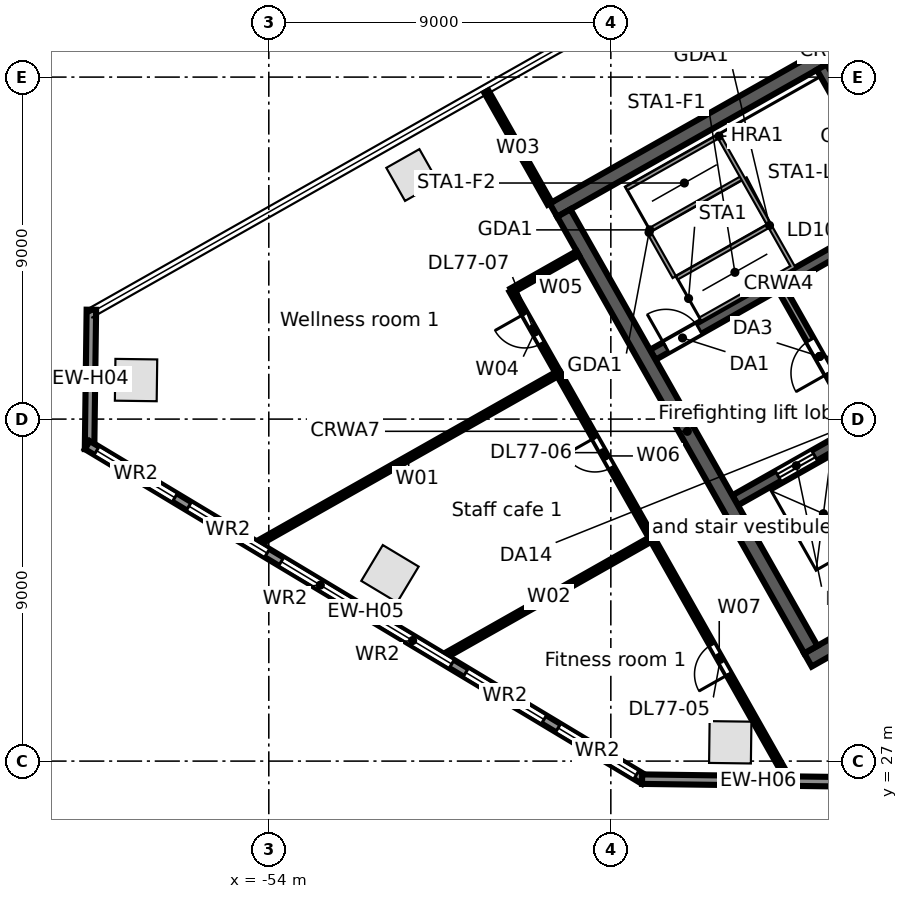
"""IFC4 building model, lengths in metres.
Left out: names, types, materials, properties, quantities, classifications, styles, units other than length and angle.
Written with IfcOpenShell. Run it as: python <this file> out.ifc"""

import sys

from ifc_helpers import new_model, si_unit, direction, frame, frame_2d, origin, origin_2d, place, context, subcontext, project, spatial, rectangle, extrude, element, fill, save


model = new_model("IFC4")
c1 = context("Model", 3, precision=1e-05, world=origin(), true_north=direction((0.0, 1.0)))
c2 = subcontext(c1, "Body", "Model", "MODEL_VIEW")
j1 = project(units=[si_unit("LENGTHUNIT", "METRE"), si_unit("PLANEANGLEUNIT", "RADIAN")], contexts=[c1])
p1 = place(None, origin())
s1 = spatial("IfcSite", under=j1, at=p1, CompositionType="ELEMENT")
p2 = place(p1, origin())
s2 = spatial("IfcBuilding", under=s1, at=p2, CompositionType="ELEMENT")
p3 = place(p2, frame((0.0, 0.0, 343.1)))
s3 = spatial("IfcBuildingStorey", under=s2, at=p3, CompositionType="ELEMENT", Elevation=343.1)
p4 = place(p3, frame((-50.226, 42.423, 0.0), z_axis=(0.0, 0.0, 1.0), x_axis=(-0.87035569594, -0.492423560103, 0.0)))
e1 = element("IfcColumn", 1, at=p4, inside=s3, PredefinedType="COLUMN", context=c2, shape_type="SweptSolid", body=[
    extrude(rectangle(XDim=1.0, YDim=1.0, at=origin_2d()), origin(), (0.0, 0.0, 1.0), 3.8),
])
for number, where, z_axis, x_axis in (
    (2, (-57.493, 37.027, 0.0), (0.0, 0.0, 1.0), (-0.013, -1.0, 0.0)),
    (3, (-50.812, 31.931, 0.0), (0.0, 0.0, 1.0), (0.857, -0.515, 0.0)),
    (4, (-41.858, 27.495, 0.0), (0.0, 0.0, 1.0), (1.0, -0.013, 0.0)),
):
    element("IfcColumn", number, at=place(p3, frame(where, z_axis=z_axis, x_axis=x_axis)), inside=s3, PredefinedType="COLUMN", context=c2, shape_type="SweptSolid", body=[
        extrude(rectangle(XDim=1.1, YDim=1.1, at=origin_2d()), origin(), (0.0, 0.0, 1.0), 3.8),
    ])
p5 = place(p3, frame((-58.717, 35.208, 0.0), z_axis=(0.0, 0.0, 1.0), x_axis=(0.01310512158, 0.999914124207, 0.0)))
e5 = element("IfcWall", 5, at=p5, inside=s3, PredefinedType="STANDARD", context=c2, shape_type="SweptSolid", body=[
    extrude(rectangle(XDim=3.67, YDim=0.25, at=frame_2d((1.835, 0.0))), origin(), (0.0, 0.0, 1.0), 3.5),
])
p6 = place(p3, frame((-44.115, 26.507, 0.0), z_axis=(0.0, 0.0, 1.0), x_axis=(-0.857166583633, 0.515039268311, 0.0)))
e6 = element("IfcWall", 6, at=p6, inside=s3, PredefinedType="STANDARD", context=c2, shape_type="SweptSolid", body=[
    extrude(rectangle(XDim=17.106, YDim=0.25, at=frame_2d((8.553, 0.0))), origin(), (0.0, 0.0, 1.0), 3.5),
])
p7 = place(p6, frame((14.417, 0.0, 0.8)))
e7 = element("IfcOpeningElement", 7, at=p7, cuts=e6, PredefinedType="OPENING", context=c2, shape_type="SweptSolid", body=[
    extrude(rectangle(XDim=2.4, YDim=2.2, at=frame_2d((1.2, 1.1))), frame((0.0, 0.135, 0.0), z_axis=(0.0, -1.0, 0.0), x_axis=(1.0, 0.0, 0.0)), (0.0, 0.0, 1.0), 0.27),
])
p8 = place(p6, frame((11.584, 0.0, 0.8)))
e8 = element("IfcOpeningElement", 8, at=p8, cuts=e6, PredefinedType="OPENING", context=c2, shape_type="SweptSolid", body=[
    extrude(rectangle(XDim=2.4, YDim=2.2, at=frame_2d((1.2, 1.1))), frame((0.0, 0.135, 0.0), z_axis=(0.0, -1.0, 0.0), x_axis=(1.0, 0.0, 0.0)), (0.0, 0.0, 1.0), 0.27),
])
p9 = place(p6, frame((8.75, 0.0, 0.8)))
e9 = element("IfcOpeningElement", 9, at=p9, cuts=e6, PredefinedType="OPENING", context=c2, shape_type="SweptSolid", body=[
    extrude(rectangle(XDim=2.4, YDim=2.2, at=frame_2d((1.2, 1.1))), frame((0.0, 0.135, 0.0), z_axis=(0.0, -1.0, 0.0), x_axis=(1.0, 0.0, 0.0)), (0.0, 0.0, 1.0), 0.27),
])
p10 = place(p6, frame((5.917, 0.0, 0.8)))
e10 = element("IfcOpeningElement", 10, at=p10, cuts=e6, PredefinedType="OPENING", context=c2, shape_type="SweptSolid", body=[
    extrude(rectangle(XDim=2.4, YDim=2.2, at=frame_2d((1.2, 1.1))), frame((0.0, 0.135, 0.0), z_axis=(0.0, -1.0, 0.0), x_axis=(1.0, 0.0, 0.0)), (0.0, 0.0, 1.0), 0.27),
])
p11 = place(p6, frame((3.084, 0.0, 0.8)))
e11 = element("IfcOpeningElement", 11, at=p11, cuts=e6, PredefinedType="OPENING", context=c2, shape_type="SweptSolid", body=[
    extrude(rectangle(XDim=2.4, YDim=2.2, at=frame_2d((1.2, 1.1))), frame((0.0, 0.135, 0.0), z_axis=(0.0, -1.0, 0.0), x_axis=(1.0, 0.0, 0.0)), (0.0, 0.0, 1.0), 0.27),
])
p12 = place(p6, frame((0.25, 0.0, 0.8)))
e12 = element("IfcOpeningElement", 12, at=p12, cuts=e6, PredefinedType="OPENING", context=c2, shape_type="SweptSolid", body=[
    extrude(rectangle(XDim=2.4, YDim=2.2, at=frame_2d((1.2, 1.1))), frame((0.0, 0.135, 0.0), z_axis=(0.0, -1.0, 0.0), x_axis=(1.0, 0.0, 0.0)), (0.0, 0.0, 1.0), 0.27),
])
p13 = place(p3, frame((-38.064, 26.445, 0.0), z_axis=(0.0, 0.0, 1.0), x_axis=(-0.999914239143, 0.013096349097, 0.0)))
e13 = element("IfcWall", 13, at=p13, inside=s3, PredefinedType="STANDARD", context=c2, shape_type="SweptSolid", body=[
    extrude(rectangle(XDim=6.115, YDim=0.25, at=frame_2d((3.057, 0.0))), origin(), (0.0, 0.0, 1.0), 3.5),
])
p14 = place(p3, frame((-39.813, 29.662, 0.0), z_axis=(0.0, 0.0, 1.0), x_axis=(0.870350116061, 0.492433422375, 0.0)))
e14 = element("IfcWall", 14, at=p14, inside=s3, PredefinedType="SOLIDWALL", context=c2, shape_type="SweptSolid", body=[
    extrude(rectangle(XDim=17.0, YDim=0.4, at=frame_2d((8.5, 0.0))), origin(), (0.0, 0.0, 1.0), 3.5),
])
p15 = place(p14, frame((7.2, 0.0, 0.0)))
e15 = element("IfcOpeningElement", 15, at=p15, cuts=e14, PredefinedType="OPENING", context=c2, shape_type="SweptSolid", body=[
    extrude(rectangle(XDim=1.2, YDim=2.1, at=frame_2d((0.6, 1.05))), frame((0.0, 0.21, 0.0), z_axis=(0.0, -1.0, 0.0), x_axis=(1.0, 0.0, 0.0)), (0.0, 0.0, 1.0), 0.42),
])
p16 = place(p3, frame((-41.73, 33.863, 0.0), z_axis=(0.0, 0.0, 1.0), x_axis=(0.870350800578, 0.492432212525, 0.0)))
e16 = element("IfcWall", 16, at=p16, inside=s3, PredefinedType="SOLIDWALL", context=c2, shape_type="SweptSolid", body=[
    extrude(rectangle(XDim=6.2, YDim=0.3, at=frame_2d((3.1, 0.0))), origin(), (0.0, 0.0, 1.0), 3.5),
])
p17 = place(p16, frame((1.3, 0.0, 0.0)))
e17 = element("IfcOpeningElement", 17, at=p17, cuts=e16, PredefinedType="OPENING", context=c2, shape_type="SweptSolid", body=[
    extrude(rectangle(XDim=1.1, YDim=2.1, at=frame_2d((0.55, 1.05))), frame((0.0, 0.16, 0.0), z_axis=(0.0, -1.0, 0.0), x_axis=(1.0, 0.0, 0.0)), (0.0, 0.0, 1.0), 0.32),
])
p18 = place(p16, frame((4.95, 0.0, 0.0)))
e18 = element("IfcOpeningElement", 18, at=p18, cuts=e16, PredefinedType="OPENING", context=c2, shape_type="SweptSolid", body=[
    extrude(rectangle(XDim=0.9, YDim=2.1, at=frame_2d((0.45, 1.05))), frame((0.0, 0.16, 0.0), z_axis=(0.0, -1.0, 0.0), x_axis=(1.0, 0.0, 0.0)), (0.0, 0.0, 1.0), 0.32),
])
p19 = place(p3, frame((-43.897, 37.692, 0.0), z_axis=(0.0, 0.0, 1.0), x_axis=(0.870356351998, 0.492422400523, 0.0)))
e19 = element("IfcWall", 19, at=p19, inside=s3, PredefinedType="SOLIDWALL", context=c2, shape_type="SweptSolid", body=[
    extrude(rectangle(XDim=7.6, YDim=0.3, at=frame_2d((3.8, 0.0))), origin(), (0.0, 0.0, 1.0), 3.5),
])
p20 = place(p19, frame((0.4, 0.0, 0.0)))
e20 = element("IfcOpeningElement", 20, at=p20, cuts=e19, PredefinedType="OPENING", context=c2, shape_type="SweptSolid", body=[
    extrude(rectangle(XDim=1.0, YDim=2.1, at=frame_2d((0.5, 1.05))), frame((0.0, 0.16, 0.0), z_axis=(0.0, -1.0, 0.0), x_axis=(1.0, 0.0, 0.0)), (0.0, 0.0, 1.0), 0.32),
])
p21 = place(p3, frame((-46.51, 41.499, 0.0), z_axis=(0.0, 0.0, 1.0), x_axis=(0.870356271124, 0.492422543467, 0.0)))
e21 = element("IfcWall", 21, at=p21, inside=s3, PredefinedType="SOLIDWALL", context=c2, shape_type="SweptSolid", body=[
    extrude(rectangle(XDim=17.0, YDim=0.4, at=frame_2d((8.5, 0.0))), origin(), (0.0, 0.0, 1.0), 3.5),
])
p22 = place(p3, frame((-46.238, 41.423, 0.0), z_axis=(0.0, 0.0, 1.0), x_axis=(0.492421663121, -0.870356769198, 0.0)))
e22 = element("IfcWall", 22, at=p22, inside=s3, PredefinedType="SOLIDWALL", context=c2, shape_type="SweptSolid", body=[
    extrude(rectangle(XDim=13.2, YDim=0.4, at=frame_2d((6.6, 0.0))), origin(), (0.0, 0.0, 1.0), 3.5),
])
p23 = place(p3, frame((-40.516, 39.433, 0.0), z_axis=(0.0, 0.0, 1.0), x_axis=(0.492453559952, -0.87033872216, 0.0)))
e23 = element("IfcWall", 23, at=p23, inside=s3, PredefinedType="PARTITIONING", context=c2, shape_type="SweptSolid", body=[
    extrude(rectangle(XDim=4.1, YDim=0.2, at=frame_2d((2.05, 0.0))), origin(), (0.0, 0.0, 1.0), 3.5),
])
p24 = place(p23, frame((1.55, 0.0, 0.0)))
e24 = element("IfcOpeningElement", 24, at=p24, cuts=e23, PredefinedType="OPENING", context=c2, shape_type="SweptSolid", body=[
    extrude(rectangle(XDim=1.0, YDim=2.1, at=frame_2d((0.5, 1.05))), frame((0.0, 0.11, 0.0), z_axis=(0.0, -1.0, 0.0), x_axis=(1.0, 0.0, 0.0)), (0.0, 0.0, 1.0), 0.22),
])
p25 = place(p3, frame((-39.449, 45.264, 0.0), z_axis=(0.0, 0.0, 1.0), x_axis=(0.492422543467, -0.870356271124, 0.0)))
e25 = element("IfcWall", 25, at=p25, inside=s3, PredefinedType="SOLIDWALL", context=c2, shape_type="SweptSolid", body=[
    extrude(rectangle(XDim=4.25, YDim=0.3, at=frame_2d((2.125, 0.0))), origin(), (0.0, 0.0, 1.0), 3.5),
])
p26 = place(p3, frame((-54.26, 32.749, 0.0), z_axis=(0.0, 0.0, 1.0), x_axis=(0.870418654615, 0.492312264419, 0.0)))
e26 = element("IfcWall", 26, at=p26, inside=s3, PredefinedType="PARTITIONING", context=c2, shape_type="SweptSolid", body=[
    extrude(rectangle(XDim=9.053, YDim=0.125, at=frame_2d((4.527, 0.0))), origin(), (0.0, 0.0, 1.0), 2.88),
])
p27 = place(p3, frame((-49.335, 29.79, 0.0), z_axis=(0.0, 0.0, 1.0), x_axis=(0.870383085237, 0.492375146542, 0.0)))
e27 = element("IfcWall", 27, at=p27, inside=s3, PredefinedType="PARTITIONING", context=c2, shape_type="SweptSolid", body=[
    extrude(rectangle(XDim=6.225, YDim=0.125, at=frame_2d((3.112, 0.0))), origin(), (0.0, 0.0, 1.0), 2.88),
])
p28 = place(p3, frame((-48.275, 44.618, 0.0), z_axis=(0.0, 0.0, 1.0), x_axis=(0.492404360331, -0.870366558369, 0.0)))
e28 = element("IfcWall", 28, at=p28, inside=s3, PredefinedType="PARTITIONING", context=c2, shape_type="SweptSolid", body=[
    extrude(rectangle(XDim=3.384, YDim=0.125, at=frame_2d((1.692, 0.0))), origin(), (0.0, 0.0, 1.0), 2.88),
])
p29 = place(p3, frame((-47.611, 39.382, 0.0), z_axis=(0.0, 0.0, 1.0), x_axis=(0.49244332707, -0.870344512032, 0.0)))
e29 = element("IfcWall", 29, at=p29, inside=s3, PredefinedType="PARTITIONING", context=c2, shape_type="SweptSolid", body=[
    extrude(rectangle(XDim=2.5, YDim=0.125, at=frame_2d((1.25, 0.0))), origin(), (0.0, 0.0, 1.0), 3.5),
])
p30 = place(p29, frame((0.7, 0.0, 0.0)))
e30 = element("IfcOpeningElement", 30, at=p30, cuts=e29, PredefinedType="OPENING", context=c2, shape_type="SweptSolid", body=[
    extrude(rectangle(XDim=0.9, YDim=2.1, at=frame_2d((0.45, 1.05))), frame((0.0, 0.073, 0.0), z_axis=(0.0, -1.0, 0.0), x_axis=(1.0, 0.0, 0.0)), (0.0, 0.0, 1.0), 0.145),
])
p31 = place(p3, frame((-47.611, 39.382, 0.0), z_axis=(0.0, 0.0, 1.0), x_axis=(0.870383193662, 0.492374954878, 0.0)))
e31 = element("IfcWall", 31, at=p31, inside=s3, PredefinedType="PARTITIONING", context=c2, shape_type="SweptSolid", body=[
    extrude(rectangle(XDim=2.0, YDim=0.125, at=frame_2d((1.0, 0.0))), origin(), (0.0, 0.0, 1.0), 3.5),
])
p32 = place(p3, frame((-46.38, 37.206, 0.0), z_axis=(0.0, 0.0, 1.0), x_axis=(0.49260101091, -0.870255275221, 0.0)))
e32 = element("IfcWall", 32, at=p32, inside=s3, PredefinedType="PARTITIONING", context=c2, shape_type="SweptSolid", body=[
    extrude(rectangle(XDim=5.0, YDim=0.125, at=frame_2d((2.5, 0.0))), origin(), (0.0, 0.0, 1.0), 2.88),
])
p33 = place(p32, frame((1.95, 0.0, 0.0)))
e33 = element("IfcOpeningElement", 33, at=p33, cuts=e32, PredefinedType="OPENING", context=c2, shape_type="SweptSolid", body=[
    extrude(rectangle(XDim=0.9, YDim=2.1, at=frame_2d((0.45, 1.05))), frame((0.0, 0.073, 0.0), z_axis=(0.0, -1.0, 0.0), x_axis=(1.0, 0.0, 0.0)), (0.0, 0.0, 1.0), 0.145),
])
p34 = place(p3, frame((-43.917, 32.855, 0.0), z_axis=(0.0, 0.0, 1.0), x_axis=(0.492446757002, -0.870342571358, 0.0)))
e34 = element("IfcWall", 34, at=p34, inside=s3, PredefinedType="PARTITIONING", context=c2, shape_type="SweptSolid", body=[
    extrude(rectangle(XDim=7.187, YDim=0.125, at=frame_2d((3.593, 0.0))), origin(), (0.0, 0.0, 1.0), 2.88),
])
p35 = place(p34, frame((3.2, 0.0, 0.0)))
e35 = element("IfcOpeningElement", 35, at=p35, cuts=e34, PredefinedType="OPENING", context=c2, shape_type="SweptSolid", body=[
    extrude(rectangle(XDim=0.9, YDim=2.1, at=frame_2d((0.45, 1.05))), frame((0.0, 0.073, 0.0), z_axis=(0.0, -1.0, 0.0), x_axis=(1.0, 0.0, 0.0)), (0.0, 0.0, 1.0), 0.145),
])
p36 = place(p7, origin())
e36 = element("IfcWindow", 36, at=p36, inside=s3, PartitioningType="SINGLE_PANEL", PredefinedType="WINDOW", context=c2, shape_type="SweptSolid", body=[
    extrude(rectangle(XDim=2.4, YDim=2.2, at=frame_2d((1.2, 1.1))), frame((0.0, 0.03, 0.0), z_axis=(0.0, -1.0, 0.0), x_axis=(1.0, 0.0, 0.0)), (0.0, 0.0, 1.0), 0.06),
])
fill(e7, e36)
p37 = place(p8, origin())
e37 = element("IfcWindow", 37, at=p37, inside=s3, PartitioningType="SINGLE_PANEL", PredefinedType="WINDOW", context=c2, shape_type="SweptSolid", body=[
    extrude(rectangle(XDim=2.4, YDim=2.2, at=frame_2d((1.2, 1.1))), frame((0.0, 0.03, 0.0), z_axis=(0.0, -1.0, 0.0), x_axis=(1.0, 0.0, 0.0)), (0.0, 0.0, 1.0), 0.06),
])
fill(e8, e37)
p38 = place(p9, origin())
e38 = element("IfcWindow", 38, at=p38, inside=s3, PartitioningType="SINGLE_PANEL", PredefinedType="WINDOW", context=c2, shape_type="SweptSolid", body=[
    extrude(rectangle(XDim=2.4, YDim=2.2, at=frame_2d((1.2, 1.1))), frame((0.0, 0.03, 0.0), z_axis=(0.0, -1.0, 0.0), x_axis=(1.0, 0.0, 0.0)), (0.0, 0.0, 1.0), 0.06),
])
fill(e9, e38)
p39 = place(p10, origin())
e39 = element("IfcWindow", 39, at=p39, inside=s3, PartitioningType="SINGLE_PANEL", PredefinedType="WINDOW", context=c2, shape_type="SweptSolid", body=[
    extrude(rectangle(XDim=2.4, YDim=2.2, at=frame_2d((1.2, 1.1))), frame((0.0, 0.03, 0.0), z_axis=(0.0, -1.0, 0.0), x_axis=(1.0, 0.0, 0.0)), (0.0, 0.0, 1.0), 0.06),
])
fill(e10, e39)
p40 = place(p11, origin())
e40 = element("IfcWindow", 40, at=p40, inside=s3, PartitioningType="SINGLE_PANEL", PredefinedType="WINDOW", context=c2, shape_type="SweptSolid", body=[
    extrude(rectangle(XDim=2.4, YDim=2.2, at=frame_2d((1.2, 1.1))), frame((0.0, 0.03, 0.0), z_axis=(0.0, -1.0, 0.0), x_axis=(1.0, 0.0, 0.0)), (0.0, 0.0, 1.0), 0.06),
])
fill(e11, e40)
p41 = place(p12, origin())
e41 = element("IfcWindow", 41, at=p41, inside=s3, PartitioningType="SINGLE_PANEL", PredefinedType="WINDOW", context=c2, shape_type="SweptSolid", body=[
    extrude(rectangle(XDim=2.4, YDim=2.2, at=frame_2d((1.2, 1.1))), frame((0.0, 0.03, 0.0), z_axis=(0.0, -1.0, 0.0), x_axis=(1.0, 0.0, 0.0)), (0.0, 0.0, 1.0), 0.06),
])
fill(e12, e41)
p42 = place(p17, origin())
e42 = element("IfcDoor", 42, at=p42, inside=s3, OperationType="DOUBLE_DOOR_SLIDING", PredefinedType="DOOR", context=c2, shape_type="SweptSolid", body=[
    extrude(rectangle(XDim=1.1, YDim=2.1, at=frame_2d((0.55, 1.05))), frame((0.0, 0.025, 0.0), z_axis=(0.0, -1.0, 0.0), x_axis=(1.0, 0.0, 0.0)), (0.0, 0.0, 1.0), 0.05),
])
fill(e17, e42)
p43 = place(p20, origin())
e43 = element("IfcDoor", 43, at=p43, inside=s3, OperationType="SINGLE_SWING_LEFT", PredefinedType="DOOR", context=c2, shape_type="SweptSolid", body=[
    extrude(rectangle(XDim=1.0, YDim=2.1, at=frame_2d((0.5, 1.05))), frame((0.0, 0.025, 0.0), z_axis=(0.0, -1.0, 0.0), x_axis=(1.0, 0.0, 0.0)), (0.0, 0.0, 1.0), 0.05),
])
fill(e20, e43)
p44 = place(p24, frame((1.0, 0.0, 0.0), z_axis=(0.0, 0.0, 1.0), x_axis=(-1.0, 0.0, 0.0)))
e44 = element("IfcDoor", 44, at=p44, inside=s3, OperationType="SINGLE_SWING_LEFT", PredefinedType="DOOR", context=c2, shape_type="SweptSolid", body=[
    extrude(rectangle(XDim=1.0, YDim=2.1, at=frame_2d((0.5, 1.05))), frame((0.0, 0.025, 0.0), z_axis=(0.0, -1.0, 0.0), x_axis=(1.0, 0.0, 0.0)), (0.0, 0.0, 1.0), 0.05),
])
fill(e24, e44)
p45 = place(p35, frame((0.9, 0.0, 0.0), z_axis=(0.0, 0.0, 1.0), x_axis=(-1.0, 0.0, 0.0)))
e45 = element("IfcDoor", 45, at=p45, inside=s3, OperationType="SINGLE_SWING_LEFT", PredefinedType="DOOR", context=c2, shape_type="SweptSolid", body=[
    extrude(rectangle(XDim=0.9, YDim=2.1, at=frame_2d((0.45, 1.05))), frame((0.0, 0.025, 0.0), z_axis=(0.0, -1.0, 0.0), x_axis=(1.0, 0.0, 0.0)), (0.0, 0.0, 1.0), 0.05),
])
fill(e35, e45)
p46 = place(p33, frame((0.9, 0.0, 0.0), z_axis=(0.0, 0.0, 1.0), x_axis=(-1.0, 0.0, 0.0)))
e46 = element("IfcDoor", 46, at=p46, inside=s3, OperationType="SINGLE_SWING_RIGHT", PredefinedType="DOOR", context=c2, shape_type="SweptSolid", body=[
    extrude(rectangle(XDim=0.9, YDim=2.1, at=frame_2d((0.45, 1.05))), frame((0.0, 0.025, 0.0), z_axis=(0.0, -1.0, 0.0), x_axis=(1.0, 0.0, 0.0)), (0.0, 0.0, 1.0), 0.05),
])
fill(e33, e46)
p47 = place(p30, frame((0.9, 0.0, 0.0), z_axis=(0.0, 0.0, 1.0), x_axis=(-1.0, 0.0, 0.0)))
e47 = element("IfcDoor", 47, at=p47, inside=s3, OperationType="SINGLE_SWING_RIGHT", PredefinedType="DOOR", context=c2, shape_type="SweptSolid", body=[
    extrude(rectangle(XDim=0.9, YDim=2.1, at=frame_2d((0.45, 1.05))), frame((0.0, 0.025, 0.0), z_axis=(0.0, -1.0, 0.0), x_axis=(1.0, 0.0, 0.0)), (0.0, 0.0, 1.0), 0.05),
])
fill(e30, e47)
save(model, sys.argv[1])
